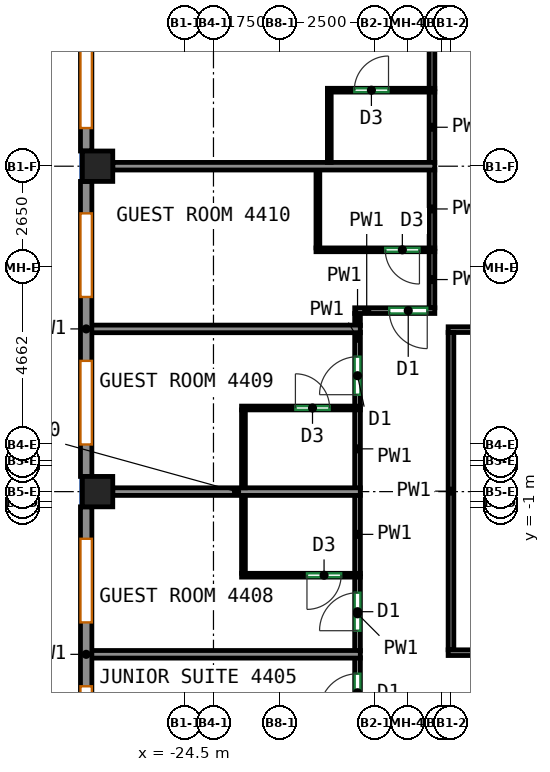
"""IFC4 building model, lengths in metres.
Left out: names, types, materials, properties, quantities, classifications, styles, units other than length and angle.
Written with IfcOpenShell. Run it as: python <this file> out.ifc"""

import sys

from ifc_helpers import new_model, si_unit, direction, frame, frame_2d, origin, origin_2d, place, context, subcontext, project, spatial, rectangle, extrude, source, transform, mapped, element, fill, save


model = new_model("IFC4")
c1 = context("Model", 3, precision=1e-05, world=origin(), true_north=direction((0.0, 1.0)))
c2 = subcontext(c1, "Body", "Model", "MODEL_VIEW")
j1 = project(units=[si_unit("LENGTHUNIT", "METRE"), si_unit("PLANEANGLEUNIT", "RADIAN")], contexts=[c1])
p1 = place(None, origin())
s1 = spatial("IfcSite", under=j1, at=p1, CompositionType="ELEMENT")
p2 = place(p1, origin())
s2 = spatial("IfcBuilding", under=s1, at=p2, CompositionType="ELEMENT")
p3 = place(p2, frame((0.0, 0.0, 185.5)))
s3 = spatial("IfcBuildingStorey", under=s2, at=p3, CompositionType="ELEMENT", Elevation=185.5)
m1 = source(origin(), c2, "Body", "SweptSolid", [
    extrude(rectangle(XDim=0.8, YDim=0.8, at=origin_2d()), origin(), (0.0, 0.0, 1.0), 3.12),
])
for number, where, z_axis, x_axis in (
    (1, (-26.8, -0.562, 0.0), (0.0, 0.0, 1.0), (1.0, 0.0, 0.0)),
    (2, (-26.8, 8.0, 0.0), (0.0, 0.0, 1.0), (1.0, 0.0, 0.0)),
):
    element("IfcColumn", number, at=place(p3, frame(where, z_axis=z_axis, x_axis=x_axis)), inside=s3, PredefinedType="COLUMN", context=c2, shape_type="MappedRepresentation", body=[
        mapped(m1, transform((0.0, 0.0, 0.0))),
    ])
m2 = source(origin(), c2, "Body", "SweptSolid", [
    extrude(rectangle(XDim=13.632, YDim=0.3, at=frame_2d((6.816, 0.0))), origin(), (0.0, 0.0, 1.0), 3.12),
])
p4 = place(p3, frame((-27.1, 22.032, 0.0), z_axis=(0.0, 0.0, 1.0), x_axis=(0.0, -1.0, 0.0)))
e3 = element("IfcWall", 3, at=p4, inside=s3, PredefinedType="SOLIDWALL", context=c2, shape_type="MappedRepresentation", body=[
    mapped(m2, transform((0.0, 0.0, 0.0))),
])
p5 = place(p4, frame((0.604, 0.0, 0.85)))
e4 = element("IfcOpeningElement", 4, at=p5, cuts=e3, PredefinedType="OPENING", context=c2, shape_type="SweptSolid", body=[
    extrude(rectangle(XDim=2.2, YDim=1.95, at=frame_2d((1.1, 0.975))), frame((0.0, 0.16, 0.0), z_axis=(0.0, -1.0, 0.0), x_axis=(1.0, 0.0, 0.0)), (0.0, 0.0, 1.0), 0.32),
])
p6 = place(p4, frame((4.012, 0.0, 0.85)))
e5 = element("IfcOpeningElement", 5, at=p6, cuts=e3, PredefinedType="OPENING", context=c2, shape_type="SweptSolid", body=[
    extrude(rectangle(XDim=2.2, YDim=1.95, at=frame_2d((1.1, 0.975))), frame((0.0, 0.16, 0.0), z_axis=(0.0, -1.0, 0.0), x_axis=(1.0, 0.0, 0.0)), (0.0, 0.0, 1.0), 0.32),
])
p7 = place(p4, frame((7.42, 0.0, 0.85)))
e6 = element("IfcOpeningElement", 6, at=p7, cuts=e3, PredefinedType="OPENING", context=c2, shape_type="SweptSolid", body=[
    extrude(rectangle(XDim=2.2, YDim=1.95, at=frame_2d((1.1, 0.975))), frame((0.0, 0.16, 0.0), z_axis=(0.0, -1.0, 0.0), x_axis=(1.0, 0.0, 0.0)), (0.0, 0.0, 1.0), 0.32),
])
p8 = place(p4, frame((10.828, 0.0, 0.85)))
e7 = element("IfcOpeningElement", 7, at=p8, cuts=e3, PredefinedType="OPENING", context=c2, shape_type="SweptSolid", body=[
    extrude(rectangle(XDim=2.2, YDim=1.95, at=frame_2d((1.1, 0.975))), frame((0.0, 0.16, 0.0), z_axis=(0.0, -1.0, 0.0), x_axis=(1.0, 0.0, 0.0)), (0.0, 0.0, 1.0), 0.32),
])
m3 = source(origin(), c2, "Body", "SweptSolid", [
    extrude(rectangle(XDim=7.763, YDim=0.3, at=frame_2d((3.881, 0.0))), origin(), (0.0, 0.0, 1.0), 3.12),
])
p9 = place(p3, frame((-27.1, 7.6, 0.0), z_axis=(0.0, 0.0, 1.0), x_axis=(0.0, -1.0, 0.0)))
e8 = element("IfcWall", 8, at=p9, inside=s3, PredefinedType="SOLIDWALL", context=c2, shape_type="MappedRepresentation", body=[
    mapped(m3, transform((0.0, 0.0, 0.0))),
])
p10 = place(p9, frame((0.841, 0.0, 0.85)))
e9 = element("IfcOpeningElement", 9, at=p10, cuts=e8, PredefinedType="OPENING", context=c2, shape_type="SweptSolid", body=[
    extrude(rectangle(XDim=2.2, YDim=1.95, at=frame_2d((1.1, 0.975))), frame((0.0, 0.16, 0.0), z_axis=(0.0, -1.0, 0.0), x_axis=(1.0, 0.0, 0.0)), (0.0, 0.0, 1.0), 0.32),
])
p11 = place(p9, frame((4.722, 0.0, 0.85)))
e10 = element("IfcOpeningElement", 10, at=p11, cuts=e8, PredefinedType="OPENING", context=c2, shape_type="SweptSolid", body=[
    extrude(rectangle(XDim=2.2, YDim=1.95, at=frame_2d((1.1, 0.975))), frame((0.0, 0.16, 0.0), z_axis=(0.0, -1.0, 0.0), x_axis=(1.0, 0.0, 0.0)), (0.0, 0.0, 1.0), 0.32),
])
p12 = place(p3, frame((-27.1, -0.962, 0.0), z_axis=(0.0, 0.0, 1.0), x_axis=(0.0, -1.0, 0.0)))
e11 = element("IfcWall", 11, at=p12, inside=s3, PredefinedType="SOLIDWALL", context=c2, shape_type="MappedRepresentation", body=[
    mapped(m3, transform((0.0, 0.0, 0.0))),
])
p13 = place(p12, frame((0.841, 0.0, 0.85)))
e12 = element("IfcOpeningElement", 12, at=p13, cuts=e11, PredefinedType="OPENING", context=c2, shape_type="SweptSolid", body=[
    extrude(rectangle(XDim=2.2, YDim=1.95, at=frame_2d((1.1, 0.975))), frame((0.0, 0.16, 0.0), z_axis=(0.0, -1.0, 0.0), x_axis=(1.0, 0.0, 0.0)), (0.0, 0.0, 1.0), 0.32),
])
p14 = place(p12, frame((4.722, 0.0, 0.85)))
e13 = element("IfcOpeningElement", 13, at=p14, cuts=e11, PredefinedType="OPENING", context=c2, shape_type="SweptSolid", body=[
    extrude(rectangle(XDim=2.2, YDim=1.95, at=frame_2d((1.1, 0.975))), frame((0.0, 0.16, 0.0), z_axis=(0.0, -1.0, 0.0), x_axis=(1.0, 0.0, 0.0)), (0.0, 0.0, 1.0), 0.32),
])
p15 = place(p3, frame((-19.959, -6.885, 0.0), z_axis=(0.0, 0.0, 1.0), x_axis=(0.0, 1.0, 0.0)))
e14 = element("IfcWall", 14, at=p15, inside=s3, PredefinedType="PARTITIONING", context=c2, shape_type="SweptSolid", body=[
    extrude(rectangle(XDim=1.952, YDim=0.15, at=frame_2d((0.976, 0.0))), origin(), (0.0, 0.0, 1.0), 3.12),
])
p16 = place(p15, frame((0.531, 0.0, 0.0)))
e15 = element("IfcOpeningElement", 15, at=p16, cuts=e14, PredefinedType="OPENING", context=c2, shape_type="SweptSolid", body=[
    extrude(rectangle(XDim=1.0, YDim=2.1, at=frame_2d((0.5, 1.05))), frame((0.0, 0.085, 0.0), z_axis=(0.0, -1.0, 0.0), x_axis=(1.0, 0.0, 0.0)), (0.0, 0.0, 1.0), 0.17),
])
p17 = place(p3, frame((-19.959, -4.753, 0.0), z_axis=(0.0, 0.0, 1.0), x_axis=(0.0, 1.0, 0.0)))
e16 = element("IfcWall", 16, at=p17, inside=s3, PredefinedType="PARTITIONING", context=c2, shape_type="SweptSolid", body=[
    extrude(rectangle(XDim=1.951, YDim=0.15, at=frame_2d((0.976, 0.0))), origin(), (0.0, 0.0, 1.0), 3.12),
])
p18 = place(p17, frame((0.531, 0.0, 0.0)))
e17 = element("IfcOpeningElement", 17, at=p18, cuts=e16, PredefinedType="OPENING", context=c2, shape_type="SweptSolid", body=[
    extrude(rectangle(XDim=1.0, YDim=2.1, at=frame_2d((0.5, 1.05))), frame((0.0, 0.085, 0.0), z_axis=(0.0, -1.0, 0.0), x_axis=(1.0, 0.0, 0.0)), (0.0, 0.0, 1.0), 0.17),
])
p19 = place(p3, frame((-19.959, -2.722, 0.0), z_axis=(0.0, 0.0, 1.0), x_axis=(0.0, 1.0, 0.0)))
e18 = element("IfcWall", 18, at=p19, inside=s3, PredefinedType="PARTITIONING", context=c2, shape_type="SweptSolid", body=[
    extrude(rectangle(XDim=2.07, YDim=0.15, at=frame_2d((1.035, 0.0))), origin(), (0.0, 0.0, 1.0), 3.12),
])
p20 = place(p3, frame((-19.959, 1.678, 0.0), z_axis=(0.0, 0.0, 1.0), x_axis=(0.0, 1.0, 0.0)))
e19 = element("IfcWall", 19, at=p20, inside=s3, PredefinedType="PARTITIONING", context=c2, shape_type="SweptSolid", body=[
    extrude(rectangle(XDim=1.951, YDim=0.15, at=frame_2d((0.976, 0.0))), origin(), (0.0, 0.0, 1.0), 3.12),
])
p21 = place(p20, frame((0.31, 0.0, 0.0)))
e20 = element("IfcOpeningElement", 20, at=p21, cuts=e19, PredefinedType="OPENING", context=c2, shape_type="SweptSolid", body=[
    extrude(rectangle(XDim=1.0, YDim=2.1, at=frame_2d((0.5, 1.05))), frame((0.0, 0.085, 0.0), z_axis=(0.0, -1.0, 0.0), x_axis=(1.0, 0.0, 0.0)), (0.0, 0.0, 1.0), 0.17),
])
p22 = place(p3, frame((-19.959, -0.472, 0.0), z_axis=(0.0, 0.0, 1.0), x_axis=(0.0, 1.0, 0.0)))
e21 = element("IfcWall", 21, at=p22, inside=s3, PredefinedType="PARTITIONING", context=c2, shape_type="SweptSolid", body=[
    extrude(rectangle(XDim=2.07, YDim=0.15, at=frame_2d((1.035, 0.0))), origin(), (0.0, 0.0, 1.0), 3.12),
])
p23 = place(p3, frame((-19.959, 3.809, 0.0), z_axis=(0.0, 0.0, 1.0), x_axis=(0.0, 1.0, 0.0)))
e22 = element("IfcWall", 22, at=p23, inside=s3, PredefinedType="PARTITIONING", context=c2, shape_type="SweptSolid", body=[
    extrude(rectangle(XDim=0.316, YDim=0.15, at=frame_2d((0.158, 0.0))), origin(), (0.0, 0.0, 1.0), 3.12),
])
p24 = place(p3, frame((-17.925, 4.2, 0.0), z_axis=(0.0, 0.0, 1.0), x_axis=(-1.0, 0.0, 0.0)))
e23 = element("IfcWall", 23, at=p24, inside=s3, PredefinedType="PARTITIONING", context=c2, shape_type="SweptSolid", body=[
    extrude(rectangle(XDim=2.109, YDim=0.15, at=frame_2d((1.054, 0.0))), origin(), (0.0, 0.0, 1.0), 3.12),
])
p25 = place(p24, frame((0.2, 0.0, 0.0)))
e24 = element("IfcOpeningElement", 24, at=p25, cuts=e23, PredefinedType="OPENING", context=c2, shape_type="SweptSolid", body=[
    extrude(rectangle(XDim=1.0, YDim=2.1, at=frame_2d((0.5, 1.05))), frame((0.0, 0.085, 0.0), z_axis=(0.0, -1.0, 0.0), x_axis=(1.0, 0.0, 0.0)), (0.0, 0.0, 1.0), 0.17),
])
p26 = place(p3, frame((-18.0, 4.275, 0.0), z_axis=(0.0, 0.0, 1.0), x_axis=(0.0, 1.0, 0.0)))
e25 = element("IfcWall", 25, at=p26, inside=s3, PredefinedType="PARTITIONING", context=c2, shape_type="SweptSolid", body=[
    extrude(rectangle(XDim=1.485, YDim=0.15, at=frame_2d((0.743, 0.0))), origin(), (0.0, 0.0, 1.0), 3.12),
])
p27 = place(p3, frame((-18.0, 5.84, 0.0), z_axis=(0.0, 0.0, 1.0), x_axis=(0.0, 1.0, 0.0)))
e26 = element("IfcWall", 26, at=p27, inside=s3, PredefinedType="PARTITIONING", context=c2, shape_type="SweptSolid", body=[
    extrude(rectangle(XDim=2.07, YDim=0.15, at=frame_2d((1.035, 0.0))), origin(), (0.0, 0.0, 1.0), 3.12),
])
p28 = place(p3, frame((-18.0, 10.04, 0.0), z_axis=(0.0, 0.0, 1.0), x_axis=(0.0, 1.0, 0.0)))
e27 = element("IfcWall", 27, at=p28, inside=s3, PredefinedType="PARTITIONING", context=c2, shape_type="SweptSolid", body=[
    extrude(rectangle(XDim=4.707, YDim=0.15, at=frame_2d((2.354, 0.0))), origin(), (0.0, 0.0, 1.0), 3.12),
])
p29 = place(p28, frame((1.102, 0.0, 0.0)))
e28 = element("IfcOpeningElement", 28, at=p29, cuts=e27, PredefinedType="OPENING", context=c2, shape_type="SweptSolid", body=[
    extrude(rectangle(XDim=1.0, YDim=2.1, at=frame_2d((0.5, 1.05))), frame((0.0, 0.085, 0.0), z_axis=(0.0, -1.0, 0.0), x_axis=(1.0, 0.0, 0.0)), (0.0, 0.0, 1.0), 0.17),
])
p30 = place(p3, frame((-18.0, 8.09, 0.0), z_axis=(0.0, 0.0, 1.0), x_axis=(0.0, 1.0, 0.0)))
e29 = element("IfcWall", 29, at=p30, inside=s3, PredefinedType="PARTITIONING", context=c2, shape_type="SweptSolid", body=[
    extrude(rectangle(XDim=1.87, YDim=0.15, at=frame_2d((0.935, 0.0))), origin(), (0.0, 0.0, 1.0), 3.12),
])
p31 = place(p3, frame((-17.575, 3.7, 0.0), z_axis=(0.0, 0.0, 1.0), x_axis=(1.0, 0.0, 0.0)))
e30 = element("IfcWall", 30, at=p31, inside=s3, PredefinedType="PARTITIONING", context=c2, shape_type="SweptSolid", body=[
    extrude(rectangle(XDim=33.85, YDim=0.15, at=frame_2d((16.925, 0.0))), origin(), (0.0, 0.0, 1.0), 3.12),
])
p32 = place(p31, frame((4.201, 0.0, 0.0)))
e31 = element("IfcOpeningElement", 31, at=p32, cuts=e30, PredefinedType="OPENING", context=c2, shape_type="SweptSolid", body=[
    extrude(rectangle(XDim=0.9, YDim=2.1, at=frame_2d((0.45, 1.05))), frame((0.0, 0.085, 0.0), z_axis=(0.0, -1.0, 0.0), x_axis=(1.0, 0.0, 0.0)), (0.0, 0.0, 1.0), 0.17),
])
p33 = place(p31, frame((13.22, 0.0, 0.0)))
e32 = element("IfcOpeningElement", 32, at=p33, cuts=e30, PredefinedType="OPENING", context=c2, shape_type="SweptSolid", body=[
    extrude(rectangle(XDim=0.9, YDim=2.1, at=frame_2d((0.45, 1.05))), frame((0.0, 0.085, 0.0), z_axis=(0.0, -1.0, 0.0), x_axis=(1.0, 0.0, 0.0)), (0.0, 0.0, 1.0), 0.17),
])
p34 = place(p31, frame((23.959, 0.0, 0.0)))
e33 = element("IfcOpeningElement", 33, at=p34, cuts=e30, PredefinedType="OPENING", context=c2, shape_type="SweptSolid", body=[
    extrude(rectangle(XDim=0.9, YDim=2.1, at=frame_2d((0.45, 1.05))), frame((0.0, 0.085, 0.0), z_axis=(0.0, -1.0, 0.0), x_axis=(1.0, 0.0, 0.0)), (0.0, 0.0, 1.0), 0.17),
])
p35 = place(p3, frame((-17.5, -4.725, 0.0), z_axis=(0.0, 0.0, 1.0), x_axis=(0.0, 1.0, 0.0)))
e34 = element("IfcWall", 34, at=p35, inside=s3, PredefinedType="PARTITIONING", context=c2, shape_type="SweptSolid", body=[
    extrude(rectangle(XDim=8.35, YDim=0.15, at=frame_2d((4.175, 0.0))), origin(), (0.0, 0.0, 1.0), 3.12),
])
p36 = place(p3, frame((-17.575, -4.8, 0.0), z_axis=(0.0, 0.0, 1.0), x_axis=(1.0, 0.0, 0.0)))
e35 = element("IfcWall", 35, at=p36, inside=s3, PredefinedType="PARTITIONING", context=c2, shape_type="SweptSolid", body=[
    extrude(rectangle(XDim=3.702, YDim=0.15, at=frame_2d((1.851, 0.0))), origin(), (0.0, 0.0, 1.0), 3.12),
])
p37 = place(p3, frame((-27.0, -4.843, 0.0), z_axis=(0.0, 0.0, 1.0), x_axis=(1.0, 0.0, 0.0)))
e36 = element("IfcWall", 36, at=p37, inside=s3, PredefinedType="PARTITIONING", context=c2, shape_type="SweptSolid", body=[
    extrude(rectangle(XDim=7.114, YDim=0.2, at=frame_2d((3.557, 0.0))), origin(), (0.0, 0.0, 1.0), 3.12),
])
p38 = place(p3, frame((-19.886, -2.762, 0.0), z_axis=(0.0, 0.0, 1.0), x_axis=(-1.0, 0.0, 0.0)))
e37 = element("IfcWall", 37, at=p38, inside=s3, PredefinedType="PARTITIONING", context=c2, shape_type="SweptSolid", body=[
    extrude(rectangle(XDim=3.125, YDim=0.1, at=frame_2d((1.562, 0.0))), origin(), (0.0, 0.0, 1.0), 3.12),
])
p39 = place(p38, frame((0.504, 0.0, 0.0)))
e38 = element("IfcOpeningElement", 38, at=p39, cuts=e37, PredefinedType="OPENING", context=c2, shape_type="SweptSolid", body=[
    extrude(rectangle(XDim=0.9, YDim=2.1, at=frame_2d((0.45, 1.05))), frame((0.0, 0.06, 0.0), z_axis=(0.0, -1.0, 0.0), x_axis=(1.0, 0.0, 0.0)), (0.0, 0.0, 1.0), 0.12),
])
p40 = place(p3, frame((-22.961, -2.712, 0.0), z_axis=(0.0, 0.0, 1.0), x_axis=(0.0, 1.0, 0.0)))
e39 = element("IfcWall", 39, at=p40, inside=s3, PredefinedType="PARTITIONING", context=c2, shape_type="SweptSolid", body=[
    extrude(rectangle(XDim=2.05, YDim=0.1, at=frame_2d((1.025, 0.0))), origin(), (0.0, 0.0, 1.0), 3.12),
])
p41 = place(p3, frame((-26.4, -0.562, 0.0), z_axis=(0.0, 0.0, 1.0), x_axis=(1.0, 0.0, 0.0)))
e40 = element("IfcWall", 40, at=p41, inside=s3, PredefinedType="PARTITIONING", context=c2, shape_type="SweptSolid", body=[
    extrude(rectangle(XDim=6.514, YDim=0.2, at=frame_2d((3.257, 0.0))), origin(), (0.0, 0.0, 1.0), 2.52),
])
p42 = place(p3, frame((-23.011, 1.638, 0.0), z_axis=(0.0, 0.0, 1.0), x_axis=(1.0, 0.0, 0.0)))
e41 = element("IfcWall", 41, at=p42, inside=s3, PredefinedType="PARTITIONING", context=c2, shape_type="SweptSolid", body=[
    extrude(rectangle(XDim=3.125, YDim=0.1, at=frame_2d((1.562, 0.0))), origin(), (0.0, 0.0, 1.0), 3.12),
])
p43 = place(p42, frame((1.417, 0.0, 0.0)))
e42 = element("IfcOpeningElement", 42, at=p43, cuts=e41, PredefinedType="OPENING", context=c2, shape_type="SweptSolid", body=[
    extrude(rectangle(XDim=0.9, YDim=2.1, at=frame_2d((0.45, 1.05))), frame((0.0, 0.06, 0.0), z_axis=(0.0, -1.0, 0.0), x_axis=(1.0, 0.0, 0.0)), (0.0, 0.0, 1.0), 0.12),
])
p44 = place(p3, frame((-22.961, -0.462, 0.0), z_axis=(0.0, 0.0, 1.0), x_axis=(0.0, 1.0, 0.0)))
e43 = element("IfcWall", 43, at=p44, inside=s3, PredefinedType="PARTITIONING", context=c2, shape_type="SweptSolid", body=[
    extrude(rectangle(XDim=2.05, YDim=0.1, at=frame_2d((1.025, 0.0))), origin(), (0.0, 0.0, 1.0), 3.12),
])
p45 = place(p3, frame((-27.0, 3.719, 0.0), z_axis=(0.0, 0.0, 1.0), x_axis=(1.0, 0.0, 0.0)))
e44 = element("IfcWall", 44, at=p45, inside=s3, PredefinedType="PARTITIONING", context=c2, shape_type="SweptSolid", body=[
    extrude(rectangle(XDim=7.114, YDim=0.2, at=frame_2d((3.557, 0.0))), origin(), (0.0, 0.0, 1.0), 3.12),
])
p46 = place(p3, frame((-17.927, 5.8, 0.0), z_axis=(0.0, 0.0, 1.0), x_axis=(-1.0, 0.0, 0.0)))
e45 = element("IfcWall", 45, at=p46, inside=s3, PredefinedType="PARTITIONING", context=c2, shape_type="SweptSolid", body=[
    extrude(rectangle(XDim=3.125, YDim=0.1, at=frame_2d((1.562, 0.0))), origin(), (0.0, 0.0, 1.0), 3.12),
])
p47 = place(p46, frame((0.403, 0.0, 0.0)))
e46 = element("IfcOpeningElement", 46, at=p47, cuts=e45, PredefinedType="OPENING", context=c2, shape_type="SweptSolid", body=[
    extrude(rectangle(XDim=0.9, YDim=2.1, at=frame_2d((0.45, 1.05))), frame((0.0, 0.06, 0.0), z_axis=(0.0, -1.0, 0.0), x_axis=(1.0, 0.0, 0.0)), (0.0, 0.0, 1.0), 0.12),
])
p48 = place(p3, frame((-21.002, 5.85, 0.0), z_axis=(0.0, 0.0, 1.0), x_axis=(0.0, 1.0, 0.0)))
e47 = element("IfcWall", 47, at=p48, inside=s3, PredefinedType="PARTITIONING", context=c2, shape_type="SweptSolid", body=[
    extrude(rectangle(XDim=2.05, YDim=0.1, at=frame_2d((1.025, 0.0))), origin(), (0.0, 0.0, 1.0), 3.12),
])
p49 = place(p3, frame((-26.4, 8.0, 0.0), z_axis=(0.0, 0.0, 1.0), x_axis=(1.0, 0.0, 0.0)))
e48 = element("IfcWall", 48, at=p49, inside=s3, PredefinedType="PARTITIONING", context=c2, shape_type="SweptSolid", body=[
    extrude(rectangle(XDim=8.473, YDim=0.2, at=frame_2d((4.236, 0.0))), origin(), (0.0, 0.0, 1.0), 3.12),
])
p50 = place(p3, frame((-20.752, 10.0, 0.0), z_axis=(0.0, 0.0, 1.0), x_axis=(1.0, 0.0, 0.0)))
e49 = element("IfcWall", 49, at=p50, inside=s3, PredefinedType="PARTITIONING", context=c2, shape_type="SweptSolid", body=[
    extrude(rectangle(XDim=2.825, YDim=0.1, at=frame_2d((1.413, 0.0))), origin(), (0.0, 0.0, 1.0), 3.12),
])
p51 = place(p50, frame((0.708, 0.0, 0.0)))
e50 = element("IfcOpeningElement", 50, at=p51, cuts=e49, PredefinedType="OPENING", context=c2, shape_type="SweptSolid", body=[
    extrude(rectangle(XDim=0.9, YDim=2.1, at=frame_2d((0.45, 1.05))), frame((0.0, 0.06, 0.0), z_axis=(0.0, -1.0, 0.0), x_axis=(1.0, 0.0, 0.0)), (0.0, 0.0, 1.0), 0.12),
])
p52 = place(p3, frame((-20.702, 8.1, 0.0), z_axis=(0.0, 0.0, 1.0), x_axis=(0.0, 1.0, 0.0)))
e51 = element("IfcWall", 51, at=p52, inside=s3, PredefinedType="PARTITIONING", context=c2, shape_type="SweptSolid", body=[
    extrude(rectangle(XDim=1.85, YDim=0.1, at=frame_2d((0.925, 0.0))), origin(), (0.0, 0.0, 1.0), 3.12),
])
p53 = place(p8, origin())
e52 = element("IfcWindow", 52, at=p53, inside=s3, PartitioningType="SINGLE_PANEL", PredefinedType="WINDOW", context=c2, shape_type="SweptSolid", body=[
    extrude(rectangle(XDim=2.2, YDim=1.95, at=frame_2d((1.1, 0.975))), frame((0.0, 0.03, 0.0), z_axis=(0.0, -1.0, 0.0), x_axis=(1.0, 0.0, 0.0)), (0.0, 0.0, 1.0), 0.06),
])
fill(e7, e52)
p54 = place(p10, origin())
e53 = element("IfcWindow", 53, at=p54, inside=s3, PartitioningType="SINGLE_PANEL", PredefinedType="WINDOW", context=c2, shape_type="SweptSolid", body=[
    extrude(rectangle(XDim=2.2, YDim=1.95, at=frame_2d((1.1, 0.975))), frame((0.0, 0.03, 0.0), z_axis=(0.0, -1.0, 0.0), x_axis=(1.0, 0.0, 0.0)), (0.0, 0.0, 1.0), 0.06),
])
fill(e9, e53)
p55 = place(p11, origin())
e54 = element("IfcWindow", 54, at=p55, inside=s3, PartitioningType="SINGLE_PANEL", PredefinedType="WINDOW", context=c2, shape_type="SweptSolid", body=[
    extrude(rectangle(XDim=2.2, YDim=1.95, at=frame_2d((1.1, 0.975))), frame((0.0, 0.03, 0.0), z_axis=(0.0, -1.0, 0.0), x_axis=(1.0, 0.0, 0.0)), (0.0, 0.0, 1.0), 0.06),
])
fill(e10, e54)
p56 = place(p13, origin())
e55 = element("IfcWindow", 55, at=p56, inside=s3, PartitioningType="SINGLE_PANEL", PredefinedType="WINDOW", context=c2, shape_type="SweptSolid", body=[
    extrude(rectangle(XDim=2.2, YDim=1.95, at=frame_2d((1.1, 0.975))), frame((0.0, 0.03, 0.0), z_axis=(0.0, -1.0, 0.0), x_axis=(1.0, 0.0, 0.0)), (0.0, 0.0, 1.0), 0.06),
])
fill(e12, e55)
p57 = place(p14, origin())
e56 = element("IfcWindow", 56, at=p57, inside=s3, PartitioningType="SINGLE_PANEL", PredefinedType="WINDOW", context=c2, shape_type="SweptSolid", body=[
    extrude(rectangle(XDim=2.2, YDim=1.95, at=frame_2d((1.1, 0.975))), frame((0.0, 0.03, 0.0), z_axis=(0.0, -1.0, 0.0), x_axis=(1.0, 0.0, 0.0)), (0.0, 0.0, 1.0), 0.06),
])
fill(e13, e56)
p58 = place(p16, origin())
e57 = element("IfcDoor", 57, at=p58, inside=s3, OperationType="SINGLE_SWING_LEFT", PredefinedType="DOOR", context=c2, shape_type="SweptSolid", body=[
    extrude(rectangle(XDim=1.0, YDim=2.1, at=frame_2d((0.5, 1.05))), frame((0.0, 0.025, 0.0), z_axis=(0.0, -1.0, 0.0), x_axis=(1.0, 0.0, 0.0)), (0.0, 0.0, 1.0), 0.05),
])
fill(e15, e57)
p59 = place(p18, origin())
e58 = element("IfcDoor", 58, at=p59, inside=s3, OperationType="SINGLE_SWING_LEFT", PredefinedType="DOOR", context=c2, shape_type="SweptSolid", body=[
    extrude(rectangle(XDim=1.0, YDim=2.1, at=frame_2d((0.5, 1.05))), frame((0.0, 0.025, 0.0), z_axis=(0.0, -1.0, 0.0), x_axis=(1.0, 0.0, 0.0)), (0.0, 0.0, 1.0), 0.05),
])
fill(e17, e58)
p60 = place(p39, origin())
e59 = element("IfcDoor", 59, at=p60, inside=s3, OperationType="SINGLE_SWING_RIGHT", PredefinedType="DOOR", context=c2, shape_type="SweptSolid", body=[
    extrude(rectangle(XDim=0.9, YDim=2.1, at=frame_2d((0.45, 1.05))), frame((0.0, 0.025, 0.0), z_axis=(0.0, -1.0, 0.0), x_axis=(1.0, 0.0, 0.0)), (0.0, 0.0, 1.0), 0.05),
])
fill(e38, e59)
p61 = place(p43, origin())
e60 = element("IfcDoor", 60, at=p61, inside=s3, OperationType="SINGLE_SWING_LEFT", PredefinedType="DOOR", context=c2, shape_type="SweptSolid", body=[
    extrude(rectangle(XDim=0.9, YDim=2.1, at=frame_2d((0.45, 1.05))), frame((0.0, 0.025, 0.0), z_axis=(0.0, -1.0, 0.0), x_axis=(1.0, 0.0, 0.0)), (0.0, 0.0, 1.0), 0.05),
])
fill(e42, e60)
p62 = place(p21, origin())
e61 = element("IfcDoor", 61, at=p62, inside=s3, OperationType="SINGLE_SWING_LEFT", PredefinedType="DOOR", context=c2, shape_type="SweptSolid", body=[
    extrude(rectangle(XDim=1.0, YDim=2.1, at=frame_2d((0.5, 1.05))), frame((0.0, 0.025, 0.0), z_axis=(0.0, -1.0, 0.0), x_axis=(1.0, 0.0, 0.0)), (0.0, 0.0, 1.0), 0.05),
])
fill(e20, e61)
p63 = place(p25, origin())
e62 = element("IfcDoor", 62, at=p63, inside=s3, OperationType="SINGLE_SWING_LEFT", PredefinedType="DOOR", context=c2, shape_type="SweptSolid", body=[
    extrude(rectangle(XDim=1.0, YDim=2.1, at=frame_2d((0.5, 1.05))), frame((0.0, 0.025, 0.0), z_axis=(0.0, -1.0, 0.0), x_axis=(1.0, 0.0, 0.0)), (0.0, 0.0, 1.0), 0.05),
])
fill(e24, e62)
p64 = place(p47, origin())
e63 = element("IfcDoor", 63, at=p64, inside=s3, OperationType="SINGLE_SWING_LEFT", PredefinedType="DOOR", context=c2, shape_type="SweptSolid", body=[
    extrude(rectangle(XDim=0.9, YDim=2.1, at=frame_2d((0.45, 1.05))), frame((0.0, 0.025, 0.0), z_axis=(0.0, -1.0, 0.0), x_axis=(1.0, 0.0, 0.0)), (0.0, 0.0, 1.0), 0.05),
])
fill(e46, e63)
p65 = place(p51, origin())
e64 = element("IfcDoor", 64, at=p65, inside=s3, OperationType="SINGLE_SWING_RIGHT", PredefinedType="DOOR", context=c2, shape_type="SweptSolid", body=[
    extrude(rectangle(XDim=0.9, YDim=2.1, at=frame_2d((0.45, 1.05))), frame((0.0, 0.025, 0.0), z_axis=(0.0, -1.0, 0.0), x_axis=(1.0, 0.0, 0.0)), (0.0, 0.0, 1.0), 0.05),
])
fill(e50, e64)
save(model, sys.argv[1])
